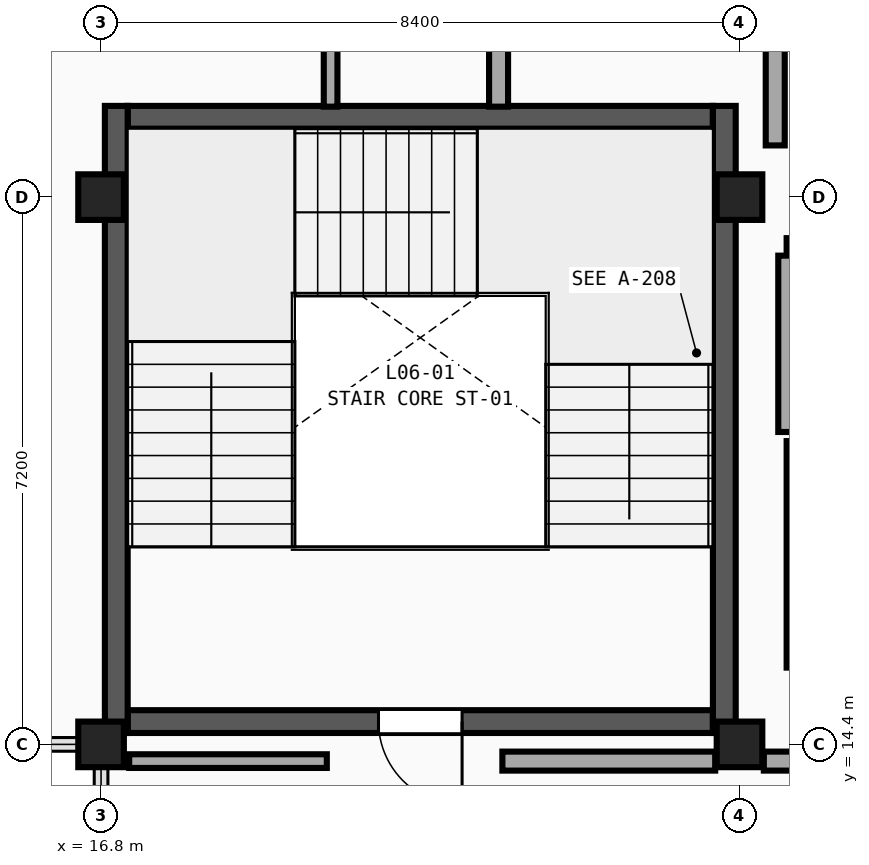
"""IFC4 building model, lengths in metres.
Left out: names, types, materials, properties, quantities, classifications, styles, units other than length and angle.
Written with IfcOpenShell. Run it as: python <this file> out.ifc"""

import sys

from ifc_helpers import new_model, si_unit, direction, frame, frame_2d, origin, origin_2d, place, context, subcontext, project, spatial, rectangle, extrude, element, fill, save


model = new_model("IFC4")
c1 = context("Model", 3, precision=1e-05, world=origin(), true_north=direction((0.0, 1.0)))
c2 = subcontext(c1, "Body", "Model", "MODEL_VIEW")
j1 = project(units=[si_unit("LENGTHUNIT", "METRE"), si_unit("PLANEANGLEUNIT", "RADIAN")], contexts=[c1])
p1 = place(None, origin())
s1 = spatial("IfcSite", under=j1, at=p1, CompositionType="ELEMENT")
p2 = place(p1, origin())
s2 = spatial("IfcBuilding", under=s1, at=p2, CompositionType="ELEMENT")
p3 = place(p2, frame((0.0, 0.0, 27.9)))
s3 = spatial("IfcBuildingStorey", under=s2, at=p3, CompositionType="ELEMENT", Elevation=27.9)
for number, where, z_axis, x_axis in (
    (1, (16.8, 14.4, 0.0), (0.0, 0.0, 1.0), (1.0, 0.0, 0.0)),
    (2, (16.8, 21.6, 0.0), (0.0, 0.0, 1.0), (1.0, 0.0, 0.0)),
    (3, (25.2, 14.4, 0.0), (0.0, 0.0, 1.0), (1.0, 0.0, 0.0)),
    (4, (25.2, 21.6, 0.0), (0.0, 0.0, 1.0), (1.0, 0.0, 0.0)),
):
    element("IfcColumn", number, at=place(p3, frame(where, z_axis=z_axis, x_axis=x_axis)), inside=s3, PredefinedType="COLUMN", context=c2, shape_type="SweptSolid", body=[
        extrude(rectangle(XDim=0.6, YDim=0.6, at=origin_2d()), origin(), (0.0, 0.0, 1.0), 4.2),
    ])
p4 = place(p3, frame((24.85, 14.7, 0.0), z_axis=(0.0, 0.0, 1.0), x_axis=(-1.0, 0.0, 0.0)))
e5 = element("IfcWall", 5, at=p4, inside=s3, PredefinedType="SHEAR", context=c2, shape_type="SweptSolid", body=[
    extrude(rectangle(XDim=7.7, YDim=0.3, at=frame_2d((3.85, 0.0))), origin(), (0.0, 0.0, 1.0), 4.2),
])
p5 = place(p4, frame((3.3, 0.0, 0.0)))
e6 = element("IfcOpeningElement", 6, at=p5, cuts=e5, PredefinedType="OPENING", context=c2, shape_type="SweptSolid", body=[
    extrude(rectangle(XDim=1.1, YDim=2.2, at=frame_2d((0.55, 1.1))), frame((0.0, 0.17, 0.0), z_axis=(0.0, -1.0, 0.0), x_axis=(1.0, 0.0, 0.0)), (0.0, 0.0, 1.0), 0.34),
])
p6 = place(p3, frame((17.15, 22.65, 0.0), z_axis=(0.0, 0.0, 1.0), x_axis=(1.0, 0.0, 0.0)))
e7 = element("IfcWall", 7, at=p6, inside=s3, PredefinedType="SHEAR", context=c2, shape_type="SweptSolid", body=[
    extrude(rectangle(XDim=7.7, YDim=0.3, at=frame_2d((3.85, 0.0))), origin(), (0.0, 0.0, 1.0), 4.2),
])
for number, where, z_axis, x_axis in (
    (8, (17.0, 22.8, 0.0), (0.0, 0.0, 1.0), (0.0, -1.0, 0.0)),
    (9, (25.0, 14.55, 0.0), (0.0, 0.0, 1.0), (0.0, 1.0, 0.0)),
):
    element("IfcWall", number, at=place(p3, frame(where, z_axis=z_axis, x_axis=x_axis)), inside=s3, PredefinedType="SHEAR", context=c2, shape_type="SweptSolid", body=[
        extrude(rectangle(XDim=8.25, YDim=0.3, at=frame_2d((4.125, 0.0))), origin(), (0.0, 0.0, 1.0), 4.2),
    ])
p7 = place(p3, frame((25.94, 18.39, 0.0), z_axis=(0.0, 0.0, 1.0), x_axis=(0.0, -1.0, 0.0)))
e10 = element("IfcWall", 10, at=p7, inside=s3, PredefinedType="SHEAR", context=c2, shape_type="SweptSolid", body=[
    extrude(rectangle(XDim=2.98, YDim=0.24, at=frame_2d((1.49, 0.0))), origin(), (0.0, 0.0, 1.0), 3.91),
])
p8 = place(p3, frame((25.82, 20.95, 0.0), z_axis=(0.0, 0.0, 1.0), x_axis=(1.0, 0.0, 0.0)))
e11 = element("IfcWall", 11, at=p8, inside=s3, PredefinedType="SOLIDWALL", context=c2, shape_type="SweptSolid", body=[
    extrude(rectangle(XDim=2.54, YDim=0.22, at=frame_2d((1.27, 0.0))), origin(), (0.0, 0.0, 1.0), 3.46),
])
p9 = place(p8, frame((0.745, 0.0, 0.0)))
e12 = element("IfcOpeningElement", 12, at=p9, cuts=e11, PredefinedType="OPENING", context=c2, shape_type="SweptSolid", body=[
    extrude(rectangle(XDim=1.05, YDim=2.15, at=frame_2d((0.525, 1.075))), frame((0.0, 0.13, 0.0), z_axis=(0.0, -1.0, 0.0), x_axis=(1.0, 0.0, 0.0)), (0.0, 0.0, 1.0), 0.26),
])
p10 = place(p3, frame((25.82, 18.51, 0.0), z_axis=(0.0, 0.0, 1.0), x_axis=(0.0, 1.0, 0.0)))
e13 = element("IfcWall", 13, at=p10, inside=s3, PredefinedType="SOLIDWALL", context=c2, shape_type="SweptSolid", body=[
    extrude(rectangle(XDim=2.32, YDim=0.22, at=frame_2d((1.16, 0.0))), origin(), (0.0, 0.0, 1.0), 3.91),
])
p11 = place(p3, frame((22.08, 14.18, 0.0), z_axis=(0.0, 0.0, 1.0), x_axis=(1.0, 0.0, 0.0)))
e14 = element("IfcWall", 14, at=p11, inside=s3, PredefinedType="SOLIDWALL", context=c2, shape_type="SweptSolid", body=[
    extrude(rectangle(XDim=2.8, YDim=0.25, at=frame_2d((1.4, 0.0))), origin(), (0.0, 0.0, 1.0), 3.46),
])
p12 = place(p3, frame((25.52, 14.18, 0.0), z_axis=(0.0, 0.0, 1.0), x_axis=(1.0, 0.0, 0.0)))
e15 = element("IfcWall", 15, at=p12, inside=s3, PredefinedType="SOLIDWALL", context=c2, shape_type="SweptSolid", body=[
    extrude(rectangle(XDim=7.76, YDim=0.25, at=frame_2d((3.88, 0.0))), origin(), (0.0, 0.0, 1.0), 3.46),
])
p13 = place(p12, frame((3.355, 0.0, 0.0)))
e16 = element("IfcOpeningElement", 16, at=p13, cuts=e15, PredefinedType="OPENING", context=c2, shape_type="SweptSolid", body=[
    extrude(rectangle(XDim=1.05, YDim=2.15, at=frame_2d((0.525, 1.075))), frame((0.0, 0.145, 0.0), z_axis=(0.0, -1.0, 0.0), x_axis=(1.0, 0.0, 0.0)), (0.0, 0.0, 1.0), 0.29),
])
p14 = place(p3, frame((17.17, 14.18, 0.0), z_axis=(0.0, 0.0, 1.0), x_axis=(1.0, 0.0, 0.0)))
e17 = element("IfcWall", 17, at=p14, inside=s3, PredefinedType="PARTITIONING", context=c2, shape_type="SweptSolid", body=[
    extrude(rectangle(XDim=2.6, YDim=0.18, at=frame_2d((1.3, 0.0))), origin(), (0.0, 0.0, 1.0), 3.46),
])
p15 = place(p3, frame((22.03, 22.79, 0.0), z_axis=(0.0, 0.0, 1.0), x_axis=(0.0, 1.0, 0.0)))
e18 = element("IfcWall", 18, at=p15, inside=s3, PredefinedType="SOLIDWALL", context=c2, shape_type="SweptSolid", body=[
    extrude(rectangle(XDim=2.23, YDim=0.25, at=frame_2d((1.115, 0.0))), origin(), (0.0, 0.0, 1.0), 3.91),
])
p16 = place(p15, frame((1.038, 0.0, 0.0)))
e19 = element("IfcOpeningElement", 19, at=p16, cuts=e18, PredefinedType="OPENING", context=c2, shape_type="SweptSolid", body=[
    extrude(rectangle(XDim=1.05, YDim=2.15, at=frame_2d((0.525, 1.075))), frame((0.0, 0.145, 0.0), z_axis=(0.0, -1.0, 0.0), x_axis=(1.0, 0.0, 0.0)), (0.0, 0.0, 1.0), 0.29),
])
p17 = place(p3, frame((19.82, 22.79, 0.0), z_axis=(0.0, 0.0, 1.0), x_axis=(0.0, 1.0, 0.0)))
e20 = element("IfcWall", 20, at=p17, inside=s3, PredefinedType="PARTITIONING", context=c2, shape_type="SweptSolid", body=[
    extrude(rectangle(XDim=2.07, YDim=0.18, at=frame_2d((1.035, 0.0))), origin(), (0.0, 0.0, 1.0), 3.91),
])
p18 = place(p3, frame((25.67, 22.28, 0.0), z_axis=(0.0, 0.0, 1.0), x_axis=(0.0, 1.0, 0.0)))
e21 = element("IfcWall", 21, at=p18, inside=s3, PredefinedType="SOLIDWALL", context=c2, shape_type="SweptSolid", body=[
    extrude(rectangle(XDim=2.59, YDim=0.25, at=frame_2d((1.295, 0.0))), origin(), (0.0, 0.0, 1.0), 3.91),
])
p19 = place(p5, origin())
e22 = element("IfcDoor", 22, at=p19, inside=s3, OperationType="SINGLE_SWING_LEFT", PredefinedType="DOOR", context=c2, shape_type="SweptSolid", body=[
    extrude(rectangle(XDim=1.1, YDim=2.2, at=frame_2d((0.55, 1.1))), frame((0.0, 0.025, 0.0), z_axis=(0.0, -1.0, 0.0), x_axis=(1.0, 0.0, 0.0)), (0.0, 0.0, 1.0), 0.05),
])
fill(e6, e22)
save(model, sys.argv[1])
